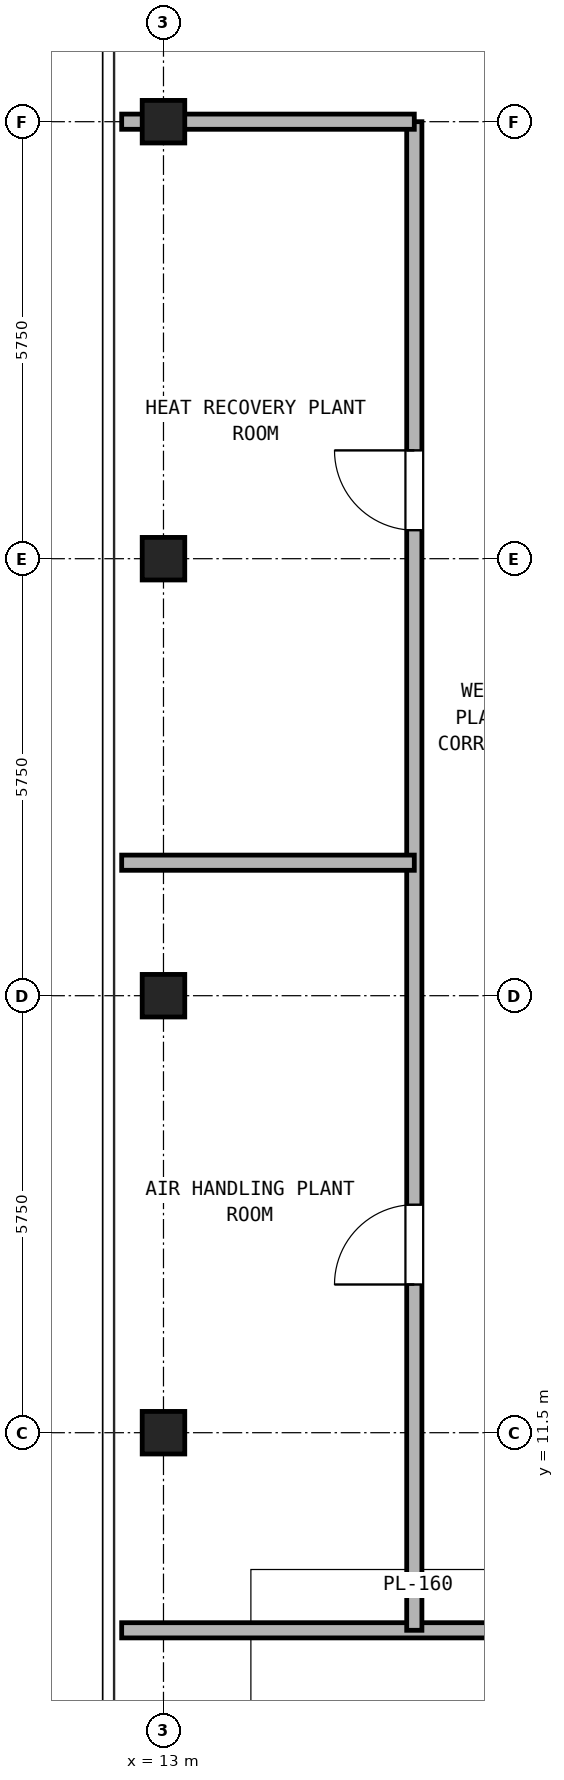
"""IFC4 building model, lengths in metres.
Left out: names, types, materials, properties, quantities, classifications, styles, units other than length and angle.
Written with IfcOpenShell. Run it as: python <this file> out.ifc"""

import sys

from ifc_helpers import new_model, si_unit, direction, frame, frame_2d, origin, origin_2d, place, context, subcontext, project, spatial, rectangle, hollow_rectangle, extrude, source, transform, mapped, element, fill, save


model = new_model("IFC4")
c1 = context("Model", 3, precision=1e-05, world=origin(), true_north=direction((0.0, 1.0)))
c2 = subcontext(c1, "Body", "Model", "MODEL_VIEW")
j1 = project(units=[si_unit("LENGTHUNIT", "METRE"), si_unit("PLANEANGLEUNIT", "RADIAN")], contexts=[c1])
p1 = place(None, origin())
s1 = spatial("IfcSite", under=j1, at=p1, CompositionType="ELEMENT")
p2 = place(p1, origin())
s2 = spatial("IfcBuilding", under=s1, at=p2, CompositionType="ELEMENT")
p3 = place(p2, frame((0.0, 0.0, 282.1)))
s3 = spatial("IfcBuildingStorey", under=s2, at=p3, CompositionType="ELEMENT", Elevation=282.1)
m1 = source(origin(), c2, "Body", "SweptSolid", [
    extrude(hollow_rectangle(XDim=0.56, YDim=0.56, WallThickness=0.03, at=origin_2d()), origin(), (0.0, 0.0, 1.0), 3.38),
])
for number, where, z_axis, x_axis in (
    (1, (13.0, 11.5, 0.0), (0.0, 0.0, 1.0), (1.0, 0.0, 0.0)),
    (2, (13.0, 17.25, 0.0), (0.0, 0.0, 1.0), (1.0, 0.0, 0.0)),
    (3, (13.0, 23.0, 0.0), (0.0, 0.0, 1.0), (1.0, 0.0, 0.0)),
    (4, (13.0, 28.75, 0.0), (0.0, 0.0, 1.0), (1.0, 0.0, 0.0)),
):
    element("IfcColumn", number, at=place(p3, frame(where, z_axis=z_axis, x_axis=x_axis)), inside=s3, PredefinedType="COLUMN", context=c2, shape_type="MappedRepresentation", body=[
        mapped(m1, transform((0.0, 0.0, 0.0), x_axis=(1.0, 0.0, 0.0), y_axis=(0.0, 1.0, 0.0), z_axis=(0.0, 0.0, 1.0), scale=1.0)),
    ])
p4 = place(p3, frame((12.45, 8.9, 0.0), z_axis=(0.0, 0.0, 1.0), x_axis=(1.0, 0.0, 0.0)))
e5 = element("IfcWall", 5, at=p4, inside=s3, PredefinedType="PARTITIONING", context=c2, shape_type="SweptSolid", body=[
    extrude(rectangle(XDim=29.1, YDim=0.2, at=frame_2d((14.55, 0.0))), origin(), (0.0, 0.0, 1.0), 3.38),
])
p5 = place(p4, frame((7.45, 0.0, 0.0)))
e6 = element("IfcOpeningElement", 6, at=p5, cuts=e5, PredefinedType="OPENING", context=c2, shape_type="SweptSolid", body=[
    extrude(rectangle(XDim=1.5, YDim=2.25, at=frame_2d((0.75, 1.125))), frame((0.0, 0.11, 0.0), z_axis=(0.0, -1.0, 0.0), x_axis=(1.0, 0.0, 0.0)), (0.0, 0.0, 1.0), 0.22),
])
p6 = place(p4, frame((14.65, 0.0, 0.0)))
e7 = element("IfcOpeningElement", 7, at=p6, cuts=e5, PredefinedType="OPENING", context=c2, shape_type="SweptSolid", body=[
    extrude(rectangle(XDim=1.5, YDim=2.25, at=frame_2d((0.75, 1.125))), frame((0.0, 0.11, 0.0), z_axis=(0.0, -1.0, 0.0), x_axis=(1.0, 0.0, 0.0)), (0.0, 0.0, 1.0), 0.22),
])
p7 = place(p3, frame((16.3, 8.9, 0.0), z_axis=(0.0, 0.0, 1.0), x_axis=(0.0, 1.0, 0.0)))
e8 = element("IfcWall", 8, at=p7, inside=s3, PredefinedType="PARTITIONING", context=c2, shape_type="SweptSolid", body=[
    extrude(rectangle(XDim=19.85, YDim=0.2, at=frame_2d((9.925, 0.0))), origin(), (0.0, 0.0, 1.0), 3.38),
])
p8 = place(p7, frame((4.55, 0.0, 0.0)))
e9 = element("IfcOpeningElement", 9, at=p8, cuts=e8, PredefinedType="OPENING", context=c2, shape_type="SweptSolid", body=[
    extrude(rectangle(XDim=1.05, YDim=2.15, at=frame_2d((0.525, 1.075))), frame((0.0, 0.11, 0.0), z_axis=(0.0, -1.0, 0.0), x_axis=(1.0, 0.0, 0.0)), (0.0, 0.0, 1.0), 0.22),
])
p9 = place(p7, frame((14.475, 0.0, 0.0)))
e10 = element("IfcOpeningElement", 10, at=p9, cuts=e8, PredefinedType="OPENING", context=c2, shape_type="SweptSolid", body=[
    extrude(rectangle(XDim=1.05, YDim=2.15, at=frame_2d((0.525, 1.075))), frame((0.0, 0.11, 0.0), z_axis=(0.0, -1.0, 0.0), x_axis=(1.0, 0.0, 0.0)), (0.0, 0.0, 1.0), 0.22),
])
p10 = place(p3, frame((12.45, 28.75, 0.0), z_axis=(0.0, 0.0, 1.0), x_axis=(1.0, 0.0, 0.0)))
e11 = element("IfcWall", 11, at=p10, inside=s3, PredefinedType="PARTITIONING", context=c2, shape_type="SweptSolid", body=[
    extrude(rectangle(XDim=3.85, YDim=0.2, at=frame_2d((1.925, 0.0))), origin(), (0.0, 0.0, 1.0), 2.905),
])
p11 = place(p3, frame((12.45, 19.0, 0.0), z_axis=(0.0, 0.0, 1.0), x_axis=(1.0, 0.0, 0.0)))
e12 = element("IfcWall", 12, at=p11, inside=s3, PredefinedType="PARTITIONING", context=c2, shape_type="SweptSolid", body=[
    extrude(rectangle(XDim=3.85, YDim=0.2, at=frame_2d((1.925, 0.0))), origin(), (0.0, 0.0, 1.0), 3.38),
])
p12 = place(p8, frame((1.05, 0.0, 0.0), z_axis=(0.0, 0.0, 1.0), x_axis=(-1.0, 0.0, 0.0)))
e13 = element("IfcDoor", 13, at=p12, inside=s3, OperationType="SINGLE_SWING_LEFT", PredefinedType="DOOR", context=c2, shape_type="SweptSolid", body=[
    extrude(rectangle(XDim=1.05, YDim=2.15, at=frame_2d((0.525, 1.075))), frame((0.0, 0.025, 0.0), z_axis=(0.0, -1.0, 0.0), x_axis=(1.0, 0.0, 0.0)), (0.0, 0.0, 1.0), 0.05),
])
fill(e9, e13)
p13 = place(p9, frame((1.05, 0.0, 0.0), z_axis=(0.0, 0.0, 1.0), x_axis=(-1.0, 0.0, 0.0)))
e14 = element("IfcDoor", 14, at=p13, inside=s3, OperationType="SINGLE_SWING_RIGHT", PredefinedType="DOOR", context=c2, shape_type="SweptSolid", body=[
    extrude(rectangle(XDim=1.05, YDim=2.15, at=frame_2d((0.525, 1.075))), frame((0.0, 0.025, 0.0), z_axis=(0.0, -1.0, 0.0), x_axis=(1.0, 0.0, 0.0)), (0.0, 0.0, 1.0), 0.05),
])
fill(e10, e14)
save(model, sys.argv[1])
